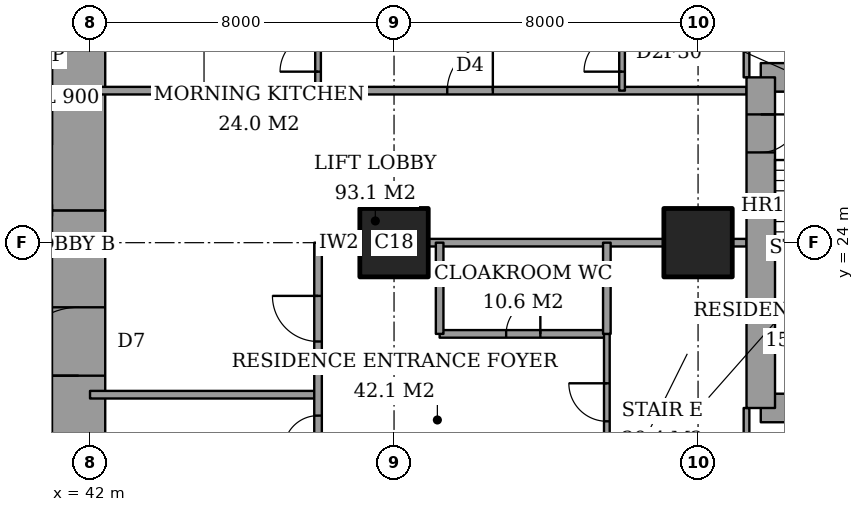
"""IFC4 building model, lengths in metres.
Left out: names, types, materials, properties, quantities, classifications, styles, units other than length and angle.
Written with IfcOpenShell. Run it as: python <this file> out.ifc"""

import sys

from ifc_helpers import new_model, si_unit, direction, frame, frame_2d, origin, origin_2d, place, context, subcontext, project, spatial, rectangle, extrude, element, fill, save


model = new_model("IFC4")
c1 = context("Model", 3, precision=1e-05, world=origin(), true_north=direction((0.0, 1.0)))
c2 = subcontext(c1, "Body", "Model", "MODEL_VIEW")
j1 = project(units=[si_unit("LENGTHUNIT", "METRE"), si_unit("PLANEANGLEUNIT", "RADIAN")], contexts=[c1])
p1 = place(None, origin())
s1 = spatial("IfcSite", under=j1, at=p1, CompositionType="ELEMENT")
p2 = place(p1, origin())
s2 = spatial("IfcBuilding", under=s1, at=p2, CompositionType="ELEMENT")
p3 = place(p2, frame((0.0, 0.0, 182.2)))
s3 = spatial("IfcBuildingStorey", under=s2, at=p3, CompositionType="ELEMENT", Elevation=182.2)
for number, where, z_axis, x_axis in (
    (1, (50.0, 24.0, 0.0), (0.0, 0.0, 1.0), (1.0, 0.0, 0.0)),
    (2, (58.0, 24.0, 0.0), (0.0, 0.0, 1.0), (1.0, 0.0, 0.0)),
):
    element("IfcColumn", number, at=place(p3, frame(where, z_axis=z_axis, x_axis=x_axis)), inside=s3, PredefinedType="COLUMN", context=c2, shape_type="SweptSolid", body=[
        extrude(rectangle(XDim=1.8, YDim=1.8, at=origin_2d()), origin(), (0.0, 0.0, 1.0), 3.6),
    ])
p4 = place(p3, frame((41.7, 13.0, 0.0), z_axis=(0.0, 0.0, 1.0), x_axis=(0.0, 1.0, 0.0)))
e3 = element("IfcWall", 3, at=p4, inside=s3, PredefinedType="SHEAR", context=c2, shape_type="SweptSolid", body=[
    extrude(rectangle(XDim=11.85, YDim=1.4, at=frame_2d((5.925, 0.0))), origin(), (0.0, 0.0, 1.0), 3.6),
])
p5 = place(p4, frame((7.5, 0.0, 0.0)))
e4 = element("IfcOpeningElement", 4, at=p5, cuts=e3, PredefinedType="OPENING", context=c2, shape_type="SweptSolid", body=[
    extrude(rectangle(XDim=1.8, YDim=2.4, at=frame_2d((0.9, 1.2))), frame((0.0, 0.71, 0.0), z_axis=(0.0, -1.0, 0.0), x_axis=(1.0, 0.0, 0.0)), (0.0, 0.0, 1.0), 1.42),
])
p6 = place(p3, frame((41.7, 24.85, 0.0), z_axis=(0.0, 0.0, 1.0), x_axis=(0.0, 1.0, 0.0)))
e5 = element("IfcWall", 5, at=p6, inside=s3, PredefinedType="SHEAR", context=c2, shape_type="SweptSolid", body=[
    extrude(rectangle(XDim=10.15, YDim=1.4, at=frame_2d((5.075, 0.0))), origin(), (0.0, 0.0, 1.0), 3.6),
])
for number, where, z_axis, x_axis in (
    (6, (59.65, 19.65, 0.0), (0.0, 0.0, 1.0), (1.0, 0.0, 0.0)),
    (7, (64.1, 28.35, 0.0), (0.0, 0.0, 1.0), (-1.0, 0.0, 0.0)),
):
    element("IfcWall", number, at=place(p3, frame(where, z_axis=z_axis, x_axis=x_axis)), inside=s3, PredefinedType="SHEAR", context=c2, shape_type="SweptSolid", body=[
        extrude(rectangle(XDim=4.45, YDim=0.75, at=frame_2d((2.225, 0.0))), origin(), (0.0, 0.0, 1.0), 3.6),
    ])
p7 = place(p3, frame((59.65, 28.35, 0.0), z_axis=(0.0, 0.0, 1.0), x_axis=(0.0, -1.0, 0.0)))
e8 = element("IfcWall", 8, at=p7, inside=s3, PredefinedType="SHEAR", context=c2, shape_type="SweptSolid", body=[
    extrude(rectangle(XDim=8.7, YDim=0.75, at=frame_2d((4.35, 0.0))), origin(), (0.0, 0.0, 1.0), 3.6),
])
p8 = place(p7, frame((0.975, 0.0, 0.0)))
e9 = element("IfcOpeningElement", 9, at=p8, cuts=e8, PredefinedType="OPENING", context=c2, shape_type="SweptSolid", body=[
    extrude(rectangle(XDim=1.0, YDim=2.1, at=frame_2d((0.5, 1.05))), frame((0.0, 0.385, 0.0), z_axis=(0.0, -1.0, 0.0), x_axis=(1.0, 0.0, 0.0)), (0.0, 0.0, 1.0), 0.77),
])
p9 = place(p3, frame((42.0, 20.0, 0.0), z_axis=(0.0, 0.0, 1.0), x_axis=(1.0, 0.0, 0.0)))
e10 = element("IfcWall", 10, at=p9, inside=s3, PredefinedType="PARTITIONING", context=c2, shape_type="SweptSolid", body=[
    extrude(rectangle(XDim=6.0, YDim=0.2, at=frame_2d((3.0, 0.0))), origin(), (0.0, 0.0, 1.0), 3.35),
])
p10 = place(p3, frame((51.2, 21.6, 0.0), z_axis=(0.0, 0.0, 1.0), x_axis=(1.0, 0.0, 0.0)))
e11 = element("IfcWall", 11, at=p10, inside=s3, PredefinedType="PARTITIONING", context=c2, shape_type="SweptSolid", body=[
    extrude(rectangle(XDim=4.4, YDim=0.2, at=frame_2d((2.2, 0.0))), origin(), (0.0, 0.0, 1.0), 3.35),
])
p11 = place(p10, frame((1.75, 0.0, 0.0)))
e12 = element("IfcOpeningElement", 12, at=p11, cuts=e11, PredefinedType="OPENING", context=c2, shape_type="SweptSolid", body=[
    extrude(rectangle(XDim=0.9, YDim=2.1, at=frame_2d((0.45, 1.05))), frame((0.0, 0.11, 0.0), z_axis=(0.0, -1.0, 0.0), x_axis=(1.0, 0.0, 0.0)), (0.0, 0.0, 1.0), 0.22),
])
p12 = place(p3, frame((48.0, 24.0, 0.0), z_axis=(0.0, 0.0, 1.0), x_axis=(1.0, 0.0, 0.0)))
e13 = element("IfcWall", 13, at=p12, inside=s3, PredefinedType="PARTITIONING", context=c2, shape_type="SweptSolid", body=[
    extrude(rectangle(XDim=1.1, YDim=0.2, at=frame_2d((0.55, 0.0))), origin(), (0.0, 0.0, 1.0), 3.35),
])
p13 = place(p3, frame((50.9, 24.0, 0.0), z_axis=(0.0, 0.0, 1.0), x_axis=(1.0, 0.0, 0.0)))
e14 = element("IfcWall", 14, at=p13, inside=s3, PredefinedType="PARTITIONING", context=c2, shape_type="SweptSolid", body=[
    extrude(rectangle(XDim=6.2, YDim=0.2, at=frame_2d((3.1, 0.0))), origin(), (0.0, 0.0, 1.0), 3.35),
])
p14 = place(p3, frame((58.9, 24.0, 0.0), z_axis=(0.0, 0.0, 1.0), x_axis=(1.0, 0.0, 0.0)))
e15 = element("IfcWall", 15, at=p14, inside=s3, PredefinedType="PARTITIONING", context=c2, shape_type="SweptSolid", body=[
    extrude(rectangle(XDim=0.375, YDim=0.2, at=frame_2d((0.188, 0.0))), origin(), (0.0, 0.0, 1.0), 3.35),
])
p15 = place(p3, frame((42.0, 28.0, 0.0), z_axis=(0.0, 0.0, 1.0), x_axis=(1.0, 0.0, 0.0)))
e16 = element("IfcWall", 16, at=p15, inside=s3, PredefinedType="PARTITIONING", context=c2, shape_type="SweptSolid", body=[
    extrude(rectangle(XDim=17.275, YDim=0.2, at=frame_2d((8.637, 0.0))), origin(), (0.0, 0.0, 1.0), 3.35),
])
p16 = place(p15, frame((9.4, 0.0, 0.0)))
e17 = element("IfcOpeningElement", 17, at=p16, cuts=e16, PredefinedType="OPENING", context=c2, shape_type="SweptSolid", body=[
    extrude(rectangle(XDim=1.2, YDim=2.4, at=frame_2d((0.6, 1.2))), frame((0.0, 0.11, 0.0), z_axis=(0.0, -1.0, 0.0), x_axis=(1.0, 0.0, 0.0)), (0.0, 0.0, 1.0), 0.22),
])
p17 = place(p3, frame((48.0, 18.0, 0.0), z_axis=(0.0, 0.0, 1.0), x_axis=(0.0, 1.0, 0.0)))
e18 = element("IfcWall", 18, at=p17, inside=s3, PredefinedType="PARTITIONING", context=c2, shape_type="SweptSolid", body=[
    extrude(rectangle(XDim=6.0, YDim=0.2, at=frame_2d((3.0, 0.0))), origin(), (0.0, 0.0, 1.0), 3.35),
])
p18 = place(p17, frame((3.4, 0.0, 0.0)))
e19 = element("IfcOpeningElement", 19, at=p18, cuts=e18, PredefinedType="OPENING", context=c2, shape_type="SweptSolid", body=[
    extrude(rectangle(XDim=1.2, YDim=2.4, at=frame_2d((0.6, 1.2))), frame((0.0, 0.11, 0.0), z_axis=(0.0, -1.0, 0.0), x_axis=(1.0, 0.0, 0.0)), (0.0, 0.0, 1.0), 0.22),
])
p19 = place(p17, frame((0.55, 0.0, 0.0)))
e20 = element("IfcOpeningElement", 20, at=p19, cuts=e18, PredefinedType="OPENING", context=c2, shape_type="SweptSolid", body=[
    extrude(rectangle(XDim=0.9, YDim=2.1, at=frame_2d((0.45, 1.05))), frame((0.0, 0.11, 0.0), z_axis=(0.0, -1.0, 0.0), x_axis=(1.0, 0.0, 0.0)), (0.0, 0.0, 1.0), 0.22),
])
p20 = place(p3, frame((48.0, 28.0, 0.0), z_axis=(0.0, 0.0, 1.0), x_axis=(0.0, 1.0, 0.0)))
e21 = element("IfcWall", 21, at=p20, inside=s3, PredefinedType="PARTITIONING", context=c2, shape_type="SweptSolid", body=[
    extrude(rectangle(XDim=9.4, YDim=0.15, at=frame_2d((4.7, 0.0))), origin(), (0.0, 0.0, 1.0), 3.35),
])
p21 = place(p20, frame((0.5, 0.0, 0.0)))
e22 = element("IfcOpeningElement", 22, at=p21, cuts=e21, PredefinedType="OPENING", context=c2, shape_type="SweptSolid", body=[
    extrude(rectangle(XDim=1.0, YDim=2.1, at=frame_2d((0.5, 1.05))), frame((0.0, 0.085, 0.0), z_axis=(0.0, -1.0, 0.0), x_axis=(1.0, 0.0, 0.0)), (0.0, 0.0, 1.0), 0.17),
])
for number, where, z_axis, x_axis in (
    (23, (51.2, 21.6, 0.0), (0.0, 0.0, 1.0), (0.0, 1.0, 0.0)),
    (24, (55.6, 21.6, 0.0), (0.0, 0.0, 1.0), (0.0, 1.0, 0.0)),
):
    element("IfcWall", number, at=place(p3, frame(where, z_axis=z_axis, x_axis=x_axis)), inside=s3, PredefinedType="PARTITIONING", context=c2, shape_type="SweptSolid", body=[
        extrude(rectangle(XDim=2.4, YDim=0.2, at=frame_2d((1.2, 0.0))), origin(), (0.0, 0.0, 1.0), 3.35),
    ])
p22 = place(p3, frame((55.6, 14.6, 0.0), z_axis=(0.0, 0.0, 1.0), x_axis=(0.0, 1.0, 0.0)))
e25 = element("IfcWall", 25, at=p22, inside=s3, PredefinedType="PARTITIONING", context=c2, shape_type="SweptSolid", body=[
    extrude(rectangle(XDim=7.0, YDim=0.15, at=frame_2d((3.5, 0.0))), origin(), (0.0, 0.0, 1.0), 3.35),
])
p23 = place(p22, frame((4.7, 0.0, 0.0)))
e26 = element("IfcOpeningElement", 26, at=p23, cuts=e25, PredefinedType="OPENING", context=c2, shape_type="SweptSolid", body=[
    extrude(rectangle(XDim=1.0, YDim=2.1, at=frame_2d((0.5, 1.05))), frame((0.0, 0.085, 0.0), z_axis=(0.0, -1.0, 0.0), x_axis=(1.0, 0.0, 0.0)), (0.0, 0.0, 1.0), 0.17),
])
p24 = place(p3, frame((56.0, 28.0, 0.0), z_axis=(0.0, 0.0, 1.0), x_axis=(0.0, 1.0, 0.0)))
e27 = element("IfcWall", 27, at=p24, inside=s3, PredefinedType="PARTITIONING", context=c2, shape_type="SweptSolid", body=[
    extrude(rectangle(XDim=9.4, YDim=0.15, at=frame_2d((4.7, 0.0))), origin(), (0.0, 0.0, 1.0), 3.35),
])
p25 = place(p24, frame((0.5, 0.0, 0.0)))
e28 = element("IfcOpeningElement", 28, at=p25, cuts=e27, PredefinedType="OPENING", context=c2, shape_type="SweptSolid", body=[
    extrude(rectangle(XDim=1.0, YDim=2.1, at=frame_2d((0.5, 1.05))), frame((0.0, 0.085, 0.0), z_axis=(0.0, -1.0, 0.0), x_axis=(1.0, 0.0, 0.0)), (0.0, 0.0, 1.0), 0.17),
])
p26 = place(p3, frame((59.275, 17.2, 0.0), z_axis=(0.0, 0.0, 1.0), x_axis=(0.0, 1.0, 0.0)))
e29 = element("IfcWall", 29, at=p26, inside=s3, PredefinedType="PARTITIONING", context=c2, shape_type="SweptSolid", body=[
    extrude(rectangle(XDim=2.45, YDim=0.15, at=frame_2d((1.225, 0.0))), origin(), (0.0, 0.0, 1.0), 3.35),
])
p27 = place(p26, frame((0.538, 0.0, 0.0)))
e30 = element("IfcOpeningElement", 30, at=p27, cuts=e29, PredefinedType="OPENING", context=c2, shape_type="SweptSolid", body=[
    extrude(rectangle(XDim=1.0, YDim=2.1, at=frame_2d((0.5, 1.05))), frame((0.0, 0.085, 0.0), z_axis=(0.0, -1.0, 0.0), x_axis=(1.0, 0.0, 0.0)), (0.0, 0.0, 1.0), 0.17),
])
p28 = place(p3, frame((59.275, 28.35, 0.0), z_axis=(0.0, 0.0, 1.0), x_axis=(0.0, 1.0, 0.0)))
e31 = element("IfcWall", 31, at=p28, inside=s3, PredefinedType="PARTITIONING", context=c2, shape_type="SweptSolid", body=[
    extrude(rectangle(XDim=2.45, YDim=0.15, at=frame_2d((1.225, 0.0))), origin(), (0.0, 0.0, 1.0), 3.35),
])
p29 = place(p28, frame((0.962, 0.0, 0.0)))
e32 = element("IfcOpeningElement", 32, at=p29, cuts=e31, PredefinedType="OPENING", context=c2, shape_type="SweptSolid", body=[
    extrude(rectangle(XDim=0.9, YDim=2.1, at=frame_2d((0.45, 1.05))), frame((0.0, 0.085, 0.0), z_axis=(0.0, -1.0, 0.0), x_axis=(1.0, 0.0, 0.0)), (0.0, 0.0, 1.0), 0.17),
])
p30 = place(p23, origin())
e33 = element("IfcDoor", 33, at=p30, inside=s3, OperationType="SINGLE_SWING_LEFT", PredefinedType="DOOR", context=c2, shape_type="SweptSolid", body=[
    extrude(rectangle(XDim=1.0, YDim=2.1, at=frame_2d((0.5, 1.05))), frame((0.0, 0.025, 0.0), z_axis=(0.0, -1.0, 0.0), x_axis=(1.0, 0.0, 0.0)), (0.0, 0.0, 1.0), 0.05),
])
fill(e26, e33)
p31 = place(p11, origin())
e34 = element("IfcDoor", 34, at=p31, inside=s3, OperationType="SINGLE_SWING_LEFT", PredefinedType="DOOR", context=c2, shape_type="SweptSolid", body=[
    extrude(rectangle(XDim=0.9, YDim=2.1, at=frame_2d((0.45, 1.05))), frame((0.0, 0.025, 0.0), z_axis=(0.0, -1.0, 0.0), x_axis=(1.0, 0.0, 0.0)), (0.0, 0.0, 1.0), 0.05),
])
fill(e12, e34)
p32 = place(p18, origin())
e35 = element("IfcDoor", 35, at=p32, inside=s3, OperationType="SINGLE_SWING_LEFT", PredefinedType="DOOR", context=c2, shape_type="SweptSolid", body=[
    extrude(rectangle(XDim=1.2, YDim=2.4, at=frame_2d((0.6, 1.2))), frame((0.0, 0.025, 0.0), z_axis=(0.0, -1.0, 0.0), x_axis=(1.0, 0.0, 0.0)), (0.0, 0.0, 1.0), 0.05),
])
fill(e19, e35)
p33 = place(p19, origin())
e36 = element("IfcDoor", 36, at=p33, inside=s3, OperationType="SINGLE_SWING_RIGHT", PredefinedType="DOOR", context=c2, shape_type="SweptSolid", body=[
    extrude(rectangle(XDim=0.9, YDim=2.1, at=frame_2d((0.45, 1.05))), frame((0.0, 0.025, 0.0), z_axis=(0.0, -1.0, 0.0), x_axis=(1.0, 0.0, 0.0)), (0.0, 0.0, 1.0), 0.05),
])
fill(e20, e36)
p34 = place(p25, origin())
e37 = element("IfcDoor", 37, at=p34, inside=s3, OperationType="SINGLE_SWING_RIGHT", PredefinedType="DOOR", context=c2, shape_type="SweptSolid", body=[
    extrude(rectangle(XDim=1.0, YDim=2.1, at=frame_2d((0.5, 1.05))), frame((0.0, 0.025, 0.0), z_axis=(0.0, -1.0, 0.0), x_axis=(1.0, 0.0, 0.0)), (0.0, 0.0, 1.0), 0.05),
])
fill(e28, e37)
p35 = place(p16, origin())
e38 = element("IfcDoor", 38, at=p35, inside=s3, OperationType="SINGLE_SWING_LEFT", PredefinedType="DOOR", context=c2, shape_type="SweptSolid", body=[
    extrude(rectangle(XDim=1.2, YDim=2.4, at=frame_2d((0.6, 1.2))), frame((0.0, 0.025, 0.0), z_axis=(0.0, -1.0, 0.0), x_axis=(1.0, 0.0, 0.0)), (0.0, 0.0, 1.0), 0.05),
])
fill(e17, e38)
p36 = place(p21, origin())
e39 = element("IfcDoor", 39, at=p36, inside=s3, OperationType="SINGLE_SWING_RIGHT", PredefinedType="DOOR", context=c2, shape_type="SweptSolid", body=[
    extrude(rectangle(XDim=1.0, YDim=2.1, at=frame_2d((0.5, 1.05))), frame((0.0, 0.025, 0.0), z_axis=(0.0, -1.0, 0.0), x_axis=(1.0, 0.0, 0.0)), (0.0, 0.0, 1.0), 0.05),
])
fill(e22, e39)
p37 = place(p5, origin())
e40 = element("IfcDoor", 40, at=p37, inside=s3, OperationType="DOUBLE_DOOR_DOUBLE_SWING", PredefinedType="DOOR", context=c2, shape_type="SweptSolid", body=[
    extrude(rectangle(XDim=1.8, YDim=2.4, at=frame_2d((0.9, 1.2))), frame((0.0, 0.025, 0.0), z_axis=(0.0, -1.0, 0.0), x_axis=(1.0, 0.0, 0.0)), (0.0, 0.0, 1.0), 0.05),
])
fill(e4, e40)
p38 = place(p8, origin())
e41 = element("IfcDoor", 41, at=p38, inside=s3, OperationType="SINGLE_SWING_RIGHT", PredefinedType="DOOR", context=c2, shape_type="SweptSolid", body=[
    extrude(rectangle(XDim=1.0, YDim=2.1, at=frame_2d((0.5, 1.05))), frame((0.0, 0.025, 0.0), z_axis=(0.0, -1.0, 0.0), x_axis=(1.0, 0.0, 0.0)), (0.0, 0.0, 1.0), 0.05),
])
fill(e9, e41)
save(model, sys.argv[1])
